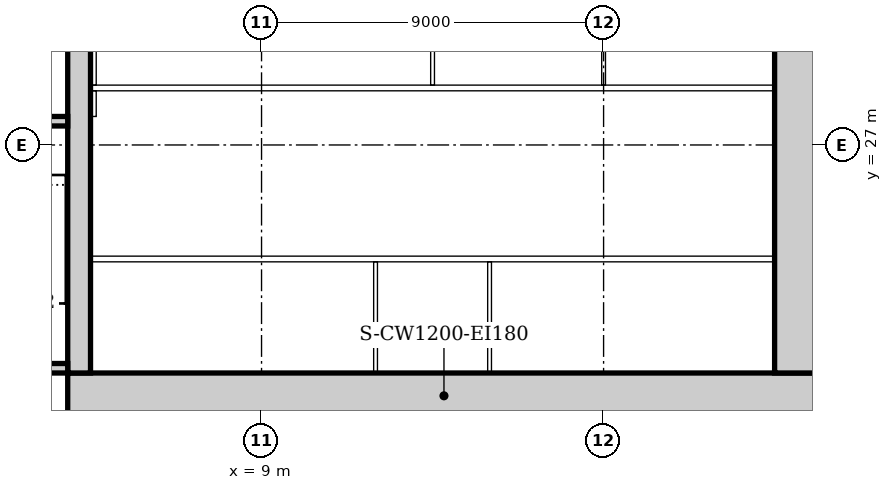
"""IFC4 building model, lengths in metres.
Left out: names, types, materials, properties, quantities, classifications, styles, units other than length and angle.
Written with IfcOpenShell. Run it as: python <this file> out.ifc"""

import sys

from ifc_helpers import new_model, si_unit, direction, frame, frame_2d, origin, place, context, subcontext, project, spatial, rectangle, extrude, element, fill, save


model = new_model("IFC4")
c1 = context("Model", 3, precision=1e-05, world=origin(), true_north=direction((0.0, 1.0)))
c2 = subcontext(c1, "Body", "Model", "MODEL_VIEW")
j1 = project(units=[si_unit("LENGTHUNIT", "METRE"), si_unit("PLANEANGLEUNIT", "RADIAN")], contexts=[c1])
p1 = place(None, origin())
s1 = spatial("IfcSite", under=j1, at=p1, CompositionType="ELEMENT")
p2 = place(p1, origin())
s2 = spatial("IfcBuilding", under=s1, at=p2, CompositionType="ELEMENT")
p3 = place(p2, frame((0.0, 0.0, -9.5)))
s3 = spatial("IfcBuildingStorey", under=s2, at=p3, CompositionType="ELEMENT", Elevation=-9.5)
p4 = place(p3, frame((3.9, 20.4, 0.0), z_axis=(0.0, 0.0, 1.0), x_axis=(1.0, 0.0, 0.0)))
e1 = element("IfcWall", 1, at=p4, inside=s3, PredefinedType="SOLIDWALL", context=c2, shape_type="SweptSolid", body=[
    extrude(rectangle(XDim=19.8, YDim=1.2, at=frame_2d((9.9, 0.0))), origin(), (0.0, 0.0, 1.0), 4.5),
])
p5 = place(p3, frame((23.1, 21.0, 0.0), z_axis=(0.0, 0.0, 1.0), x_axis=(0.0, 1.0, 0.0)))
e2 = element("IfcWall", 2, at=p5, inside=s3, PredefinedType="SOLIDWALL", context=c2, shape_type="SweptSolid", body=[
    extrude(rectangle(XDim=10.5, YDim=1.2, at=frame_2d((5.25, 0.0))), origin(), (0.0, 0.0, 1.0), 4.5),
])
p6 = place(p5, frame((4.35, 0.0, 0.0)))
e3 = element("IfcOpeningElement", 3, at=p6, cuts=e2, PredefinedType="OPENING", context=c2, shape_type="SweptSolid", body=[
    extrude(rectangle(XDim=1.8, YDim=2.1, at=frame_2d((0.9, 1.05))), frame((0.0, 0.61, 0.0), z_axis=(0.0, -1.0, 0.0), x_axis=(1.0, 0.0, 0.0)), (0.0, 0.0, 1.0), 1.22),
])
p7 = place(p3, frame((4.2, 31.5, 0.0), z_axis=(0.0, 0.0, 1.0), x_axis=(0.0, -1.0, 0.0)))
e4 = element("IfcWall", 4, at=p7, inside=s3, PredefinedType="SOLIDWALL", context=c2, shape_type="SweptSolid", body=[
    extrude(rectangle(XDim=10.5, YDim=0.6, at=frame_2d((5.25, 0.0))), origin(), (0.0, 0.0, 1.0), 4.5),
])
p8 = place(p7, frame((4.25, 0.0, 0.0)))
e5 = element("IfcOpeningElement", 5, at=p8, cuts=e4, PredefinedType="OPENING", context=c2, shape_type="SweptSolid", body=[
    extrude(rectangle(XDim=1.0, YDim=2.1, at=frame_2d((0.5, 1.05))), frame((0.0, 0.31, 0.0), z_axis=(0.0, -1.0, 0.0), x_axis=(1.0, 0.0, 0.0)), (0.0, 0.0, 1.0), 0.62),
])
p9 = place(p3, frame((0.36, 21.125, 0.0), z_axis=(0.0, 0.0, 1.0), x_axis=(1.0, 0.0, 0.0)))
e6 = element("IfcWall", 6, at=p9, inside=s3, PredefinedType="SOLIDWALL", context=c2, shape_type="SweptSolid", body=[
    extrude(rectangle(XDim=3.54, YDim=0.25, at=frame_2d((1.77, 0.0))), origin(), (0.0, 0.0, 1.0), 4.5),
])
p10 = place(p3, frame((3.9, 27.625, 0.0), z_axis=(0.0, 0.0, 1.0), x_axis=(-1.0, 0.0, 0.0)))
e7 = element("IfcWall", 7, at=p10, inside=s3, PredefinedType="SOLIDWALL", context=c2, shape_type="SweptSolid", body=[
    extrude(rectangle(XDim=3.54, YDim=0.25, at=frame_2d((1.77, 0.0))), origin(), (0.0, 0.0, 1.0), 4.5),
])
p11 = place(p10, frame((0.4, 0.0, 0.0)))
e8 = element("IfcOpeningElement", 8, at=p11, cuts=e7, PredefinedType="OPENING", context=c2, shape_type="SweptSolid", body=[
    extrude(rectangle(XDim=1.0, YDim=2.1, at=frame_2d((0.5, 1.05))), frame((0.0, 0.135, 0.0), z_axis=(0.0, -1.0, 0.0), x_axis=(1.0, 0.0, 0.0)), (0.0, 0.0, 1.0), 0.27),
])
p12 = place(p3, frame((4.5, 24.0, 0.0), z_axis=(0.0, 0.0, 1.0), x_axis=(1.0, 0.0, 0.0)))
e9 = element("IfcWall", 9, at=p12, inside=s3, PredefinedType="PARTITIONING", context=c2, shape_type="SweptSolid", body=[
    extrude(rectangle(XDim=18.0, YDim=0.15, at=frame_2d((9.0, 0.0))), origin(), (0.0, 0.0, 1.0), 4.15),
])
p13 = place(p12, frame((3.35, 0.0, 0.0)))
e10 = element("IfcOpeningElement", 10, at=p13, cuts=e9, PredefinedType="OPENING", context=c2, shape_type="SweptSolid", body=[
    extrude(rectangle(XDim=0.9, YDim=2.1, at=frame_2d((0.45, 1.05))), frame((0.0, 0.085, 0.0), z_axis=(0.0, -1.0, 0.0), x_axis=(1.0, 0.0, 0.0)), (0.0, 0.0, 1.0), 0.17),
])
p14 = place(p12, frame((8.55, 0.0, 0.0)))
e11 = element("IfcOpeningElement", 11, at=p14, cuts=e9, PredefinedType="OPENING", context=c2, shape_type="SweptSolid", body=[
    extrude(rectangle(XDim=0.9, YDim=2.1, at=frame_2d((0.45, 1.05))), frame((0.0, 0.085, 0.0), z_axis=(0.0, -1.0, 0.0), x_axis=(1.0, 0.0, 0.0)), (0.0, 0.0, 1.0), 0.17),
])
p15 = place(p12, frame((13.7, 0.0, 0.0)))
e12 = element("IfcOpeningElement", 12, at=p15, cuts=e9, PredefinedType="OPENING", context=c2, shape_type="SweptSolid", body=[
    extrude(rectangle(XDim=0.9, YDim=2.1, at=frame_2d((0.45, 1.05))), frame((0.0, 0.085, 0.0), z_axis=(0.0, -1.0, 0.0), x_axis=(1.0, 0.0, 0.0)), (0.0, 0.0, 1.0), 0.17),
])
p16 = place(p3, frame((4.5, 28.5, 0.0), z_axis=(0.0, 0.0, 1.0), x_axis=(1.0, 0.0, 0.0)))
e13 = element("IfcWall", 13, at=p16, inside=s3, PredefinedType="PARTITIONING", context=c2, shape_type="SweptSolid", body=[
    extrude(rectangle(XDim=18.0, YDim=0.15, at=frame_2d((9.0, 0.0))), origin(), (0.0, 0.0, 1.0), 4.15),
])
p17 = place(p16, frame((4.1, 0.0, 0.0)))
e14 = element("IfcOpeningElement", 14, at=p17, cuts=e13, PredefinedType="OPENING", context=c2, shape_type="SweptSolid", body=[
    extrude(rectangle(XDim=0.9, YDim=2.1, at=frame_2d((0.45, 1.05))), frame((0.0, 0.085, 0.0), z_axis=(0.0, -1.0, 0.0), x_axis=(1.0, 0.0, 0.0)), (0.0, 0.0, 1.0), 0.17),
])
p18 = place(p16, frame((10.8, 0.0, 0.0)))
e15 = element("IfcOpeningElement", 15, at=p18, cuts=e13, PredefinedType="OPENING", context=c2, shape_type="SweptSolid", body=[
    extrude(rectangle(XDim=0.9, YDim=2.1, at=frame_2d((0.45, 1.05))), frame((0.0, 0.085, 0.0), z_axis=(0.0, -1.0, 0.0), x_axis=(1.0, 0.0, 0.0)), (0.0, 0.0, 1.0), 0.17),
])
p19 = place(p16, frame((15.2, 0.0, 0.0)))
e16 = element("IfcOpeningElement", 16, at=p19, cuts=e13, PredefinedType="OPENING", context=c2, shape_type="SweptSolid", body=[
    extrude(rectangle(XDim=0.9, YDim=2.1, at=frame_2d((0.45, 1.05))), frame((0.0, 0.085, 0.0), z_axis=(0.0, -1.0, 0.0), x_axis=(1.0, 0.0, 0.0)), (0.0, 0.0, 1.0), 0.17),
])
p20 = place(p3, frame((4.575, 27.75, 0.0), z_axis=(0.0, 0.0, 1.0), x_axis=(0.0, 1.0, 0.0)))
e17 = element("IfcWall", 17, at=p20, inside=s3, PredefinedType="PARTITIONING", context=c2, shape_type="SweptSolid", body=[
    extrude(rectangle(XDim=0.675, YDim=0.15, at=frame_2d((0.338, 0.0))), origin(), (0.0, 0.0, 1.0), 4.15),
])
p21 = place(p3, frame((4.575, 28.575, 0.0), z_axis=(0.0, 0.0, 1.0), x_axis=(0.0, 1.0, 0.0)))
e18 = element("IfcWall", 18, at=p21, inside=s3, PredefinedType="PARTITIONING", context=c2, shape_type="SweptSolid", body=[
    extrude(rectangle(XDim=2.675, YDim=0.15, at=frame_2d((1.337, 0.0))), origin(), (0.0, 0.0, 1.0), 4.15),
])
p22 = place(p3, frame((12.0, 21.0, 0.0), z_axis=(0.0, 0.0, 1.0), x_axis=(0.0, 1.0, 0.0)))
e19 = element("IfcWall", 19, at=p22, inside=s3, PredefinedType="PARTITIONING", context=c2, shape_type="SweptSolid", body=[
    extrude(rectangle(XDim=2.925, YDim=0.1, at=frame_2d((1.462, 0.0))), origin(), (0.0, 0.0, 1.0), 4.15),
])
p23 = place(p3, frame((13.5, 28.575, 0.0), z_axis=(0.0, 0.0, 1.0), x_axis=(0.0, 1.0, 0.0)))
e20 = element("IfcWall", 20, at=p23, inside=s3, PredefinedType="PARTITIONING", context=c2, shape_type="SweptSolid", body=[
    extrude(rectangle(XDim=2.675, YDim=0.1, at=frame_2d((1.337, 0.0))), origin(), (0.0, 0.0, 1.0), 4.15),
])
p24 = place(p3, frame((15.0, 21.0, 0.0), z_axis=(0.0, 0.0, 1.0), x_axis=(0.0, 1.0, 0.0)))
e21 = element("IfcWall", 21, at=p24, inside=s3, PredefinedType="PARTITIONING", context=c2, shape_type="SweptSolid", body=[
    extrude(rectangle(XDim=2.925, YDim=0.1, at=frame_2d((1.462, 0.0))), origin(), (0.0, 0.0, 1.0), 4.15),
])
p25 = place(p3, frame((18.0, 28.575, 0.0), z_axis=(0.0, 0.0, 1.0), x_axis=(0.0, 1.0, 0.0)))
e22 = element("IfcWall", 22, at=p25, inside=s3, PredefinedType="PARTITIONING", context=c2, shape_type="SweptSolid", body=[
    extrude(rectangle(XDim=2.675, YDim=0.1, at=frame_2d((1.337, 0.0))), origin(), (0.0, 0.0, 1.0), 4.15),
])
p26 = place(p8, frame((1.0, 0.0, 0.0), z_axis=(0.0, 0.0, 1.0), x_axis=(-1.0, 0.0, 0.0)))
e23 = element("IfcDoor", 23, at=p26, inside=s3, OperationType="SINGLE_SWING_RIGHT", PredefinedType="DOOR", context=c2, shape_type="SweptSolid", body=[
    extrude(rectangle(XDim=1.0, YDim=2.1, at=frame_2d((0.5, 1.05))), frame((0.0, 0.025, 0.0), z_axis=(0.0, -1.0, 0.0), x_axis=(1.0, 0.0, 0.0)), (0.0, 0.0, 1.0), 0.05),
])
fill(e5, e23)
p27 = place(p6, frame((1.8, 0.0, 0.0), z_axis=(0.0, 0.0, 1.0), x_axis=(-1.0, 0.0, 0.0)))
e24 = element("IfcDoor", 24, at=p27, inside=s3, OperationType="DOUBLE_DOOR_DOUBLE_SWING", PredefinedType="DOOR", context=c2, shape_type="SweptSolid", body=[
    extrude(rectangle(XDim=1.8, YDim=2.1, at=frame_2d((0.9, 1.05))), frame((0.0, 0.025, 0.0), z_axis=(0.0, -1.0, 0.0), x_axis=(1.0, 0.0, 0.0)), (0.0, 0.0, 1.0), 0.05),
])
fill(e3, e24)
p28 = place(p13, frame((0.9, 0.0, 0.0), z_axis=(0.0, 0.0, 1.0), x_axis=(-1.0, 0.0, 0.0)))
e25 = element("IfcDoor", 25, at=p28, inside=s3, OperationType="SINGLE_SWING_LEFT", PredefinedType="DOOR", context=c2, shape_type="SweptSolid", body=[
    extrude(rectangle(XDim=0.9, YDim=2.1, at=frame_2d((0.45, 1.05))), frame((0.0, 0.025, 0.0), z_axis=(0.0, -1.0, 0.0), x_axis=(1.0, 0.0, 0.0)), (0.0, 0.0, 1.0), 0.05),
])
fill(e10, e25)
p29 = place(p14, frame((0.9, 0.0, 0.0), z_axis=(0.0, 0.0, 1.0), x_axis=(-1.0, 0.0, 0.0)))
e26 = element("IfcDoor", 26, at=p29, inside=s3, OperationType="SINGLE_SWING_LEFT", PredefinedType="DOOR", context=c2, shape_type="SweptSolid", body=[
    extrude(rectangle(XDim=0.9, YDim=2.1, at=frame_2d((0.45, 1.05))), frame((0.0, 0.025, 0.0), z_axis=(0.0, -1.0, 0.0), x_axis=(1.0, 0.0, 0.0)), (0.0, 0.0, 1.0), 0.05),
])
fill(e11, e26)
p30 = place(p15, frame((0.9, 0.0, 0.0), z_axis=(0.0, 0.0, 1.0), x_axis=(-1.0, 0.0, 0.0)))
e27 = element("IfcDoor", 27, at=p30, inside=s3, OperationType="SINGLE_SWING_RIGHT", PredefinedType="DOOR", context=c2, shape_type="SweptSolid", body=[
    extrude(rectangle(XDim=0.9, YDim=2.1, at=frame_2d((0.45, 1.05))), frame((0.0, 0.025, 0.0), z_axis=(0.0, -1.0, 0.0), x_axis=(1.0, 0.0, 0.0)), (0.0, 0.0, 1.0), 0.05),
])
fill(e12, e27)
p31 = place(p17, origin())
e28 = element("IfcDoor", 28, at=p31, inside=s3, OperationType="SINGLE_SWING_RIGHT", PredefinedType="DOOR", context=c2, shape_type="SweptSolid", body=[
    extrude(rectangle(XDim=0.9, YDim=2.1, at=frame_2d((0.45, 1.05))), frame((0.0, 0.025, 0.0), z_axis=(0.0, -1.0, 0.0), x_axis=(1.0, 0.0, 0.0)), (0.0, 0.0, 1.0), 0.05),
])
fill(e14, e28)
p32 = place(p18, origin())
e29 = element("IfcDoor", 29, at=p32, inside=s3, OperationType="SINGLE_SWING_RIGHT", PredefinedType="DOOR", context=c2, shape_type="SweptSolid", body=[
    extrude(rectangle(XDim=0.9, YDim=2.1, at=frame_2d((0.45, 1.05))), frame((0.0, 0.025, 0.0), z_axis=(0.0, -1.0, 0.0), x_axis=(1.0, 0.0, 0.0)), (0.0, 0.0, 1.0), 0.05),
])
fill(e15, e29)
p33 = place(p19, origin())
e30 = element("IfcDoor", 30, at=p33, inside=s3, OperationType="SINGLE_SWING_RIGHT", PredefinedType="DOOR", context=c2, shape_type="SweptSolid", body=[
    extrude(rectangle(XDim=0.9, YDim=2.1, at=frame_2d((0.45, 1.05))), frame((0.0, 0.025, 0.0), z_axis=(0.0, -1.0, 0.0), x_axis=(1.0, 0.0, 0.0)), (0.0, 0.0, 1.0), 0.05),
])
fill(e16, e30)
save(model, sys.argv[1])
